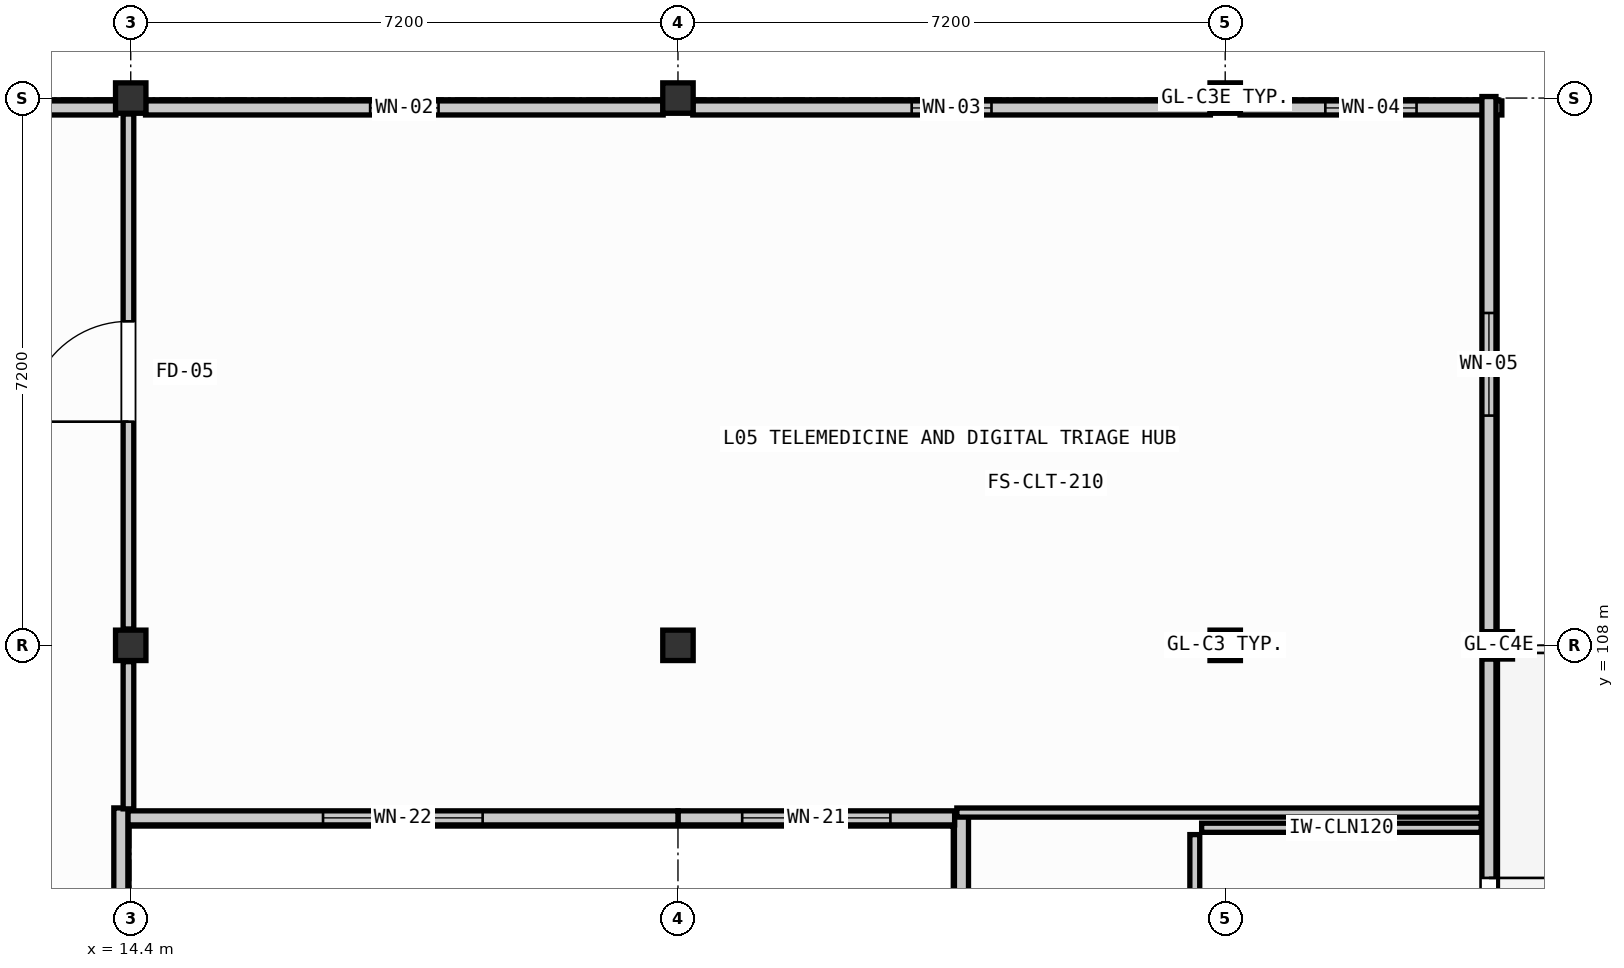
"""IFC4 building model, lengths in metres.
Left out: names, types, materials, properties, quantities, classifications, styles, units other than length and angle.
Written with IfcOpenShell. Run it as: python <this file> out.ifc"""

import sys

from ifc_helpers import new_model, si_unit, direction, frame, frame_2d, origin, origin_2d, place, context, subcontext, project, spatial, rectangle, extrude, element, fill, save


model = new_model("IFC4")
c1 = context("Model", 3, precision=1e-05, world=origin(), true_north=direction((0.0, 1.0)))
c2 = subcontext(c1, "Body", "Model", "MODEL_VIEW")
j1 = project(units=[si_unit("LENGTHUNIT", "METRE"), si_unit("PLANEANGLEUNIT", "RADIAN")], contexts=[c1])
p1 = place(None, origin())
s1 = spatial("IfcSite", under=j1, at=p1, CompositionType="ELEMENT")
p2 = place(p1, origin())
s2 = spatial("IfcBuilding", under=s1, at=p2, CompositionType="ELEMENT")
p3 = place(p2, frame((0.0, 0.0, 17.7)))
s3 = spatial("IfcBuildingStorey", under=s2, at=p3, CompositionType="ELEMENT", Elevation=17.7)
for number, where, z_axis, x_axis in (
    (1, (14.4, 108.0, 0.0), (0.0, 0.0, 1.0), (1.0, 0.0, 0.0)),
    (2, (14.4, 115.2, 0.0), (0.0, 0.0, 1.0), (1.0, 0.0, 0.0)),
    (3, (21.6, 108.0, 0.0), (0.0, 0.0, 1.0), (1.0, 0.0, 0.0)),
    (4, (21.6, 115.2, 0.0), (0.0, 0.0, 1.0), (1.0, 0.0, 0.0)),
    (5, (28.8, 108.0, 0.0), (0.0, 0.0, 1.0), (1.0, 0.0, 0.0)),
    (6, (28.8, 115.2, 0.0), (0.0, 0.0, 1.0), (1.0, 0.0, 0.0)),
):
    element("IfcColumn", number, at=place(p3, frame(where, z_axis=z_axis, x_axis=x_axis)), inside=s3, PredefinedType="COLUMN", context=c2, shape_type="SweptSolid", body=[
        extrude(rectangle(XDim=0.4, YDim=0.4, at=origin_2d()), origin(), (0.0, 0.0, 1.0), 3.69),
    ])
p4 = place(p3, frame((32.4, 108.0, 0.0), z_axis=(0.0, 0.0, 1.0), x_axis=(1.0, 0.0, 0.0)))
e7 = element("IfcColumn", 7, at=p4, inside=s3, PredefinedType="COLUMN", context=c2, shape_type="SweptSolid", body=[
    extrude(rectangle(XDim=0.36, YDim=0.36, at=origin_2d()), origin(), (0.0, 0.0, 1.0), 3.71),
])
p5 = place(p3, frame((7.395, 115.07, 0.0), z_axis=(0.0, 0.0, 1.0), x_axis=(1.0, 0.0, 0.0)))
e8 = element("IfcWall", 8, at=p5, inside=s3, PredefinedType="SOLIDWALL", context=c2, shape_type="SweptSolid", body=[
    extrude(rectangle(XDim=6.81, YDim=0.185, at=frame_2d((3.405, 0.0))), origin(), (0.0, 0.0, 1.0), 3.13),
])
p6 = place(p5, frame((3.03, 0.0, 2.1)))
e9 = element("IfcOpeningElement", 9, at=p6, cuts=e8, PredefinedType="OPENING", context=c2, shape_type="SweptSolid", body=[
    extrude(rectangle(XDim=0.75, YDim=0.65, at=frame_2d((0.375, 0.325))), frame((0.0, 0.103, 0.0), z_axis=(0.0, -1.0, 0.0), x_axis=(1.0, 0.0, 0.0)), (0.0, 0.0, 1.0), 0.205),
])
p7 = place(p3, frame((14.595, 115.07, 0.0), z_axis=(0.0, 0.0, 1.0), x_axis=(1.0, 0.0, 0.0)))
e10 = element("IfcWall", 10, at=p7, inside=s3, PredefinedType="SOLIDWALL", context=c2, shape_type="SweptSolid", body=[
    extrude(rectangle(XDim=6.81, YDim=0.185, at=frame_2d((3.405, 0.0))), origin(), (0.0, 0.0, 1.0), 3.13),
])
p8 = place(p7, frame((2.955, 0.0, 2.1)))
e11 = element("IfcOpeningElement", 11, at=p8, cuts=e10, PredefinedType="OPENING", context=c2, shape_type="SweptSolid", body=[
    extrude(rectangle(XDim=0.9, YDim=0.65, at=frame_2d((0.45, 0.325))), frame((0.0, 0.103, 0.0), z_axis=(0.0, -1.0, 0.0), x_axis=(1.0, 0.0, 0.0)), (0.0, 0.0, 1.0), 0.205),
])
p9 = place(p3, frame((21.795, 115.07, 0.0), z_axis=(0.0, 0.0, 1.0), x_axis=(1.0, 0.0, 0.0)))
e12 = element("IfcWall", 12, at=p9, inside=s3, PredefinedType="SOLIDWALL", context=c2, shape_type="SweptSolid", body=[
    extrude(rectangle(XDim=6.81, YDim=0.185, at=frame_2d((3.405, 0.0))), origin(), (0.0, 0.0, 1.0), 3.13),
])
p10 = place(p9, frame((2.88, 0.0, 2.1)))
e13 = element("IfcOpeningElement", 13, at=p10, cuts=e12, PredefinedType="OPENING", context=c2, shape_type="SweptSolid", body=[
    extrude(rectangle(XDim=1.05, YDim=0.65, at=frame_2d((0.525, 0.325))), frame((0.0, 0.103, 0.0), z_axis=(0.0, -1.0, 0.0), x_axis=(1.0, 0.0, 0.0)), (0.0, 0.0, 1.0), 0.205),
])
p11 = place(p3, frame((28.995, 115.07, 0.0), z_axis=(0.0, 0.0, 1.0), x_axis=(1.0, 0.0, 0.0)))
e14 = element("IfcWall", 14, at=p11, inside=s3, PredefinedType="SOLIDWALL", context=c2, shape_type="SweptSolid", body=[
    extrude(rectangle(XDim=3.445, YDim=0.185, at=frame_2d((1.722, 0.0))), origin(), (0.0, 0.0, 1.0), 3.13),
])
p12 = place(p11, frame((1.123, 0.0, 2.1)))
e15 = element("IfcOpeningElement", 15, at=p12, cuts=e14, PredefinedType="OPENING", context=c2, shape_type="SweptSolid", body=[
    extrude(rectangle(XDim=1.2, YDim=0.65, at=frame_2d((0.6, 0.325))), frame((0.0, 0.103, 0.0), z_axis=(0.0, -1.0, 0.0), x_axis=(1.0, 0.0, 0.0)), (0.0, 0.0, 1.0), 0.205),
])
p13 = place(p3, frame((32.27, 115.22, 0.0), z_axis=(0.0, 0.0, 1.0), x_axis=(0.0, -1.0, 0.0)))
e16 = element("IfcWall", 16, at=p13, inside=s3, PredefinedType="SOLIDWALL", context=c2, shape_type="SweptSolid", body=[
    extrude(rectangle(XDim=7.045, YDim=0.185, at=frame_2d((3.522, 0.0))), origin(), (0.0, 0.0, 1.0), 3.67),
])
p14 = place(p13, frame((2.847, 0.0, 2.1)))
e17 = element("IfcOpeningElement", 17, at=p14, cuts=e16, PredefinedType="OPENING", context=c2, shape_type="SweptSolid", body=[
    extrude(rectangle(XDim=1.35, YDim=0.65, at=frame_2d((0.675, 0.325))), frame((0.0, 0.103, 0.0), z_axis=(0.0, -1.0, 0.0), x_axis=(1.0, 0.0, 0.0)), (0.0, 0.0, 1.0), 0.205),
])
p15 = place(p3, frame((32.27, 107.825, 0.0), z_axis=(0.0, 0.0, 1.0), x_axis=(0.0, -1.0, 0.0)))
e18 = element("IfcWall", 18, at=p15, inside=s3, PredefinedType="SOLIDWALL", context=c2, shape_type="SweptSolid", body=[
    extrude(rectangle(XDim=6.85, YDim=0.185, at=frame_2d((3.425, 0.0))), origin(), (0.0, 0.0, 1.0), 3.67),
])
p16 = place(p15, frame((2.885, 0.0, 0.0)))
e19 = element("IfcOpeningElement", 19, at=p16, cuts=e18, PredefinedType="OPENING", context=c2, shape_type="SweptSolid", body=[
    extrude(rectangle(XDim=1.08, YDim=2.2, at=frame_2d((0.54, 1.1))), frame((0.0, 0.103, 0.0), z_axis=(0.0, -1.0, 0.0), x_axis=(1.0, 0.0, 0.0)), (0.0, 0.0, 1.0), 0.205),
])
p17 = place(p3, frame((25.33, 100.8, 0.0), z_axis=(0.0, 0.0, 1.0), x_axis=(0.0, 1.0, 0.0)))
e20 = element("IfcWall", 20, at=p17, inside=s3, PredefinedType="SOLIDWALL", context=c2, shape_type="SweptSolid", body=[
    extrude(rectangle(XDim=4.951, YDim=0.185, at=frame_2d((2.476, 0.0))), origin(), (0.0, 0.0, 1.0), 3.67),
])
p18 = place(p17, frame((1.51, 0.0, 1.5)))
e21 = element("IfcOpeningElement", 21, at=p18, cuts=e20, PredefinedType="OPENING", context=c2, shape_type="SweptSolid", body=[
    extrude(rectangle(XDim=1.8, YDim=0.95, at=frame_2d((0.9, 0.475))), frame((0.0, 0.103, 0.0), z_axis=(0.0, -1.0, 0.0), x_axis=(1.0, 0.0, 0.0)), (0.0, 0.0, 1.0), 0.205),
])
p19 = place(p3, frame((25.24, 105.73, 0.0), z_axis=(0.0, 0.0, 1.0), x_axis=(-1.0, 0.0, 0.0)))
e22 = element("IfcWall", 22, at=p19, inside=s3, PredefinedType="SOLIDWALL", context=c2, shape_type="SweptSolid", body=[
    extrude(rectangle(XDim=3.64, YDim=0.185, at=frame_2d((1.82, 0.0))), origin(), (0.0, 0.0, 1.0), 3.67),
])
p20 = place(p19, frame((0.845, 0.0, 1.5)))
e23 = element("IfcOpeningElement", 23, at=p20, cuts=e22, PredefinedType="OPENING", context=c2, shape_type="SweptSolid", body=[
    extrude(rectangle(XDim=1.95, YDim=0.95, at=frame_2d((0.975, 0.475))), frame((0.0, 0.103, 0.0), z_axis=(0.0, -1.0, 0.0), x_axis=(1.0, 0.0, 0.0)), (0.0, 0.0, 1.0), 0.205),
])
p21 = place(p3, frame((21.6, 105.73, 0.0), z_axis=(0.0, 0.0, 1.0), x_axis=(-1.0, 0.0, 0.0)))
e24 = element("IfcWall", 24, at=p21, inside=s3, PredefinedType="SOLIDWALL", context=c2, shape_type="SweptSolid", body=[
    extrude(rectangle(XDim=7.24, YDim=0.185, at=frame_2d((3.62, 0.0))), origin(), (0.0, 0.0, 1.0), 3.13),
])
p22 = place(p21, frame((2.57, 0.0, 1.5)))
e25 = element("IfcOpeningElement", 25, at=p22, cuts=e24, PredefinedType="OPENING", context=c2, shape_type="SweptSolid", body=[
    extrude(rectangle(XDim=2.1, YDim=0.95, at=frame_2d((1.05, 0.475))), frame((0.0, 0.103, 0.0), z_axis=(0.0, -1.0, 0.0), x_axis=(1.0, 0.0, 0.0)), (0.0, 0.0, 1.0), 0.205),
])
p23 = place(p3, frame((14.27, 105.861, 0.0), z_axis=(0.0, 0.0, 1.0), x_axis=(0.0, -1.0, 0.0)))
e26 = element("IfcWall", 26, at=p23, inside=s3, PredefinedType="SOLIDWALL", context=c2, shape_type="SweptSolid", body=[
    extrude(rectangle(XDim=4.866, YDim=0.185, at=frame_2d((2.433, 0.0))), origin(), (0.0, 0.0, 1.0), 3.05),
])
p24 = place(p23, frame((2.729, 0.0, 0.95)))
e27 = element("IfcOpeningElement", 27, at=p24, cuts=e26, PredefinedType="OPENING", context=c2, shape_type="SweptSolid", body=[
    extrude(rectangle(XDim=0.75, YDim=1.25, at=frame_2d((0.375, 0.625))), frame((0.0, 0.103, 0.0), z_axis=(0.0, -1.0, 0.0), x_axis=(1.0, 0.0, 0.0)), (0.0, 0.0, 1.0), 0.205),
])
p25 = place(p3, frame((28.49, 105.6, 0.0), z_axis=(0.0, 0.0, 1.0), x_axis=(1.0, 0.0, 0.0)))
e28 = element("IfcWall", 28, at=p25, inside=s3, PredefinedType="PARTITIONING", context=c2, shape_type="SweptSolid", body=[
    extrude(rectangle(XDim=3.677, YDim=0.12, at=frame_2d((1.839, 0.0))), origin(), (0.0, 0.0, 1.0), 3.13),
])
p26 = place(p3, frame((28.402, 88.092, 0.0), z_axis=(0.0, 0.0, 1.0), x_axis=(-0.00012614936, 0.999999992043, 0.0)))
e29 = element("IfcWall", 29, at=p26, inside=s3, PredefinedType="PARTITIONING", context=c2, shape_type="SweptSolid", body=[
    extrude(rectangle(XDim=17.418, YDim=0.13, at=frame_2d((8.709, 0.0))), origin(), (0.0, 0.0, 1.0), 3.67),
])
p27 = place(p26, frame((8.039, 0.0, 0.0)))
e30 = element("IfcOpeningElement", 30, at=p27, cuts=e29, PredefinedType="OPENING", context=c2, shape_type="SweptSolid", body=[
    extrude(rectangle(XDim=1.34, YDim=2.24, at=frame_2d((0.67, 1.12))), frame((0.0, 0.075, 0.0), z_axis=(0.0, -1.0, 0.0), x_axis=(1.0, 0.0, 0.0)), (0.0, 0.0, 1.0), 0.15),
])
p28 = place(p3, frame((32.167, 105.8, 0.0), z_axis=(0.0, 0.0, 1.0), x_axis=(-1.0, 0.0, 0.0)))
e31 = element("IfcWall", 31, at=p28, inside=s3, PredefinedType="PARTITIONING", context=c2, shape_type="SweptSolid", body=[
    extrude(rectangle(XDim=6.898, YDim=0.12, at=frame_2d((3.449, 0.0))), origin(), (0.0, 0.0, 1.0), 3.13),
])
p29 = place(p3, frame((14.37, 105.848, 0.0), z_axis=(0.0, 0.0, 1.0), x_axis=(0.0, 1.0, 0.0)))
e32 = element("IfcWall", 32, at=p29, inside=s3, PredefinedType="PARTITIONING", context=c2, shape_type="SweptSolid", body=[
    extrude(rectangle(XDim=1.937, YDim=0.14, at=frame_2d((0.968, 0.0))), origin(), (0.0, 0.0, 1.0), 3.05),
])
p30 = place(p3, frame((14.37, 108.215, 0.0), z_axis=(0.0, 0.0, 1.0), x_axis=(0.0, 1.0, 0.0)))
e33 = element("IfcWall", 33, at=p30, inside=s3, PredefinedType="PARTITIONING", context=c2, shape_type="SweptSolid", body=[
    extrude(rectangle(XDim=6.775, YDim=0.14, at=frame_2d((3.387, 0.0))), origin(), (0.0, 0.0, 1.0), 3.05),
])
p31 = place(p30, frame((2.728, 0.0, 0.0)))
e34 = element("IfcOpeningElement", 34, at=p31, cuts=e33, PredefinedType="OPENING", context=c2, shape_type="SweptSolid", body=[
    extrude(rectangle(XDim=1.32, YDim=2.2, at=frame_2d((0.66, 1.1))), frame((0.0, 0.08, 0.0), z_axis=(0.0, -1.0, 0.0), x_axis=(1.0, 0.0, 0.0)), (0.0, 0.0, 1.0), 0.16),
])
p32 = place(p8, origin())
e35 = element("IfcWindow", 35, at=p32, inside=s3, PartitioningType="SINGLE_PANEL", PredefinedType="WINDOW", context=c2, shape_type="SweptSolid", body=[
    extrude(rectangle(XDim=0.9, YDim=0.65, at=frame_2d((0.45, 0.325))), frame((0.0, 0.03, 0.0), z_axis=(0.0, -1.0, 0.0), x_axis=(1.0, 0.0, 0.0)), (0.0, 0.0, 1.0), 0.06),
])
fill(e11, e35)
p33 = place(p10, origin())
e36 = element("IfcWindow", 36, at=p33, inside=s3, PartitioningType="SINGLE_PANEL", PredefinedType="WINDOW", context=c2, shape_type="SweptSolid", body=[
    extrude(rectangle(XDim=1.05, YDim=0.65, at=frame_2d((0.525, 0.325))), frame((0.0, 0.03, 0.0), z_axis=(0.0, -1.0, 0.0), x_axis=(1.0, 0.0, 0.0)), (0.0, 0.0, 1.0), 0.06),
])
fill(e13, e36)
p34 = place(p12, origin())
e37 = element("IfcWindow", 37, at=p34, inside=s3, PartitioningType="SINGLE_PANEL", PredefinedType="WINDOW", context=c2, shape_type="SweptSolid", body=[
    extrude(rectangle(XDim=1.2, YDim=0.65, at=frame_2d((0.6, 0.325))), frame((0.0, 0.03, 0.0), z_axis=(0.0, -1.0, 0.0), x_axis=(1.0, 0.0, 0.0)), (0.0, 0.0, 1.0), 0.06),
])
fill(e15, e37)
p35 = place(p14, origin())
e38 = element("IfcWindow", 38, at=p35, inside=s3, PartitioningType="SINGLE_PANEL", PredefinedType="WINDOW", context=c2, shape_type="SweptSolid", body=[
    extrude(rectangle(XDim=1.35, YDim=0.65, at=frame_2d((0.675, 0.325))), frame((0.0, 0.03, 0.0), z_axis=(0.0, -1.0, 0.0), x_axis=(1.0, 0.0, 0.0)), (0.0, 0.0, 1.0), 0.06),
])
fill(e17, e38)
p36 = place(p16, origin())
e39 = element("IfcDoor", 39, at=p36, inside=s3, OperationType="SINGLE_SWING_LEFT", PredefinedType="DOOR", context=c2, shape_type="SweptSolid", body=[
    extrude(rectangle(XDim=1.08, YDim=2.2, at=frame_2d((0.54, 1.1))), frame((0.0, 0.025, 0.0), z_axis=(0.0, -1.0, 0.0), x_axis=(1.0, 0.0, 0.0)), (0.0, 0.0, 1.0), 0.05),
])
fill(e19, e39)
p37 = place(p20, origin())
e40 = element("IfcWindow", 40, at=p37, inside=s3, PartitioningType="SINGLE_PANEL", PredefinedType="WINDOW", context=c2, shape_type="SweptSolid", body=[
    extrude(rectangle(XDim=1.95, YDim=0.95, at=frame_2d((0.975, 0.475))), frame((0.0, 0.03, 0.0), z_axis=(0.0, -1.0, 0.0), x_axis=(1.0, 0.0, 0.0)), (0.0, 0.0, 1.0), 0.06),
])
fill(e23, e40)
p38 = place(p22, origin())
e41 = element("IfcWindow", 41, at=p38, inside=s3, PartitioningType="SINGLE_PANEL", PredefinedType="WINDOW", context=c2, shape_type="SweptSolid", body=[
    extrude(rectangle(XDim=2.1, YDim=0.95, at=frame_2d((1.05, 0.475))), frame((0.0, 0.03, 0.0), z_axis=(0.0, -1.0, 0.0), x_axis=(1.0, 0.0, 0.0)), (0.0, 0.0, 1.0), 0.06),
])
fill(e25, e41)
p39 = place(p31, origin())
e42 = element("IfcDoor", 42, at=p39, inside=s3, OperationType="SINGLE_SWING_RIGHT", PredefinedType="DOOR", context=c2, shape_type="SweptSolid", body=[
    extrude(rectangle(XDim=1.32, YDim=2.2, at=frame_2d((0.66, 1.1))), frame((0.0, 0.025, 0.0), z_axis=(0.0, -1.0, 0.0), x_axis=(1.0, 0.0, 0.0)), (0.0, 0.0, 1.0), 0.05),
])
fill(e34, e42)
save(model, sys.argv[1])
